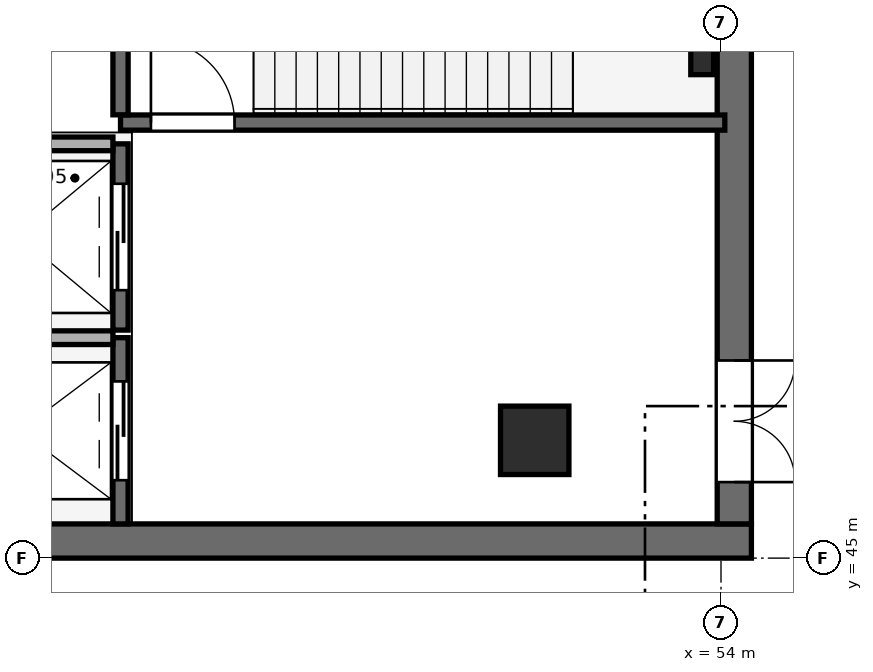
"""IFC4 building model, lengths in metres.
Left out: names, types, materials, properties, quantities, classifications, styles, units other than length and angle.
Written with IfcOpenShell. Run it as: python <this file> out.ifc"""

import sys

from ifc_helpers import new_model, si_unit, direction, frame, frame_2d, origin, origin_2d, place, context, subcontext, project, spatial, rectangle, i_section, extrude, element, fill, save


model = new_model("IFC4")
c1 = context("Model", 3, precision=1e-05, world=origin(), true_north=direction((0.0, 1.0)))
c2 = subcontext(c1, "Body", "Model", "MODEL_VIEW")
j1 = project(units=[si_unit("LENGTHUNIT", "METRE"), si_unit("PLANEANGLEUNIT", "RADIAN")], contexts=[c1])
p1 = place(None, origin())
s1 = spatial("IfcSite", under=j1, at=p1, CompositionType="ELEMENT")
p2 = place(p1, origin())
s2 = spatial("IfcBuilding", under=s1, at=p2, CompositionType="ELEMENT")
p3 = place(p2, frame((0.0, 0.0, -5.4)))
s3 = spatial("IfcBuildingStorey", under=s2, at=p3, CompositionType="ELEMENT", Elevation=-5.4)
p4 = place(p3, frame((51.549, 46.55, 0.0), z_axis=(0.0, 0.0, 1.0), x_axis=(1.0, 0.0, 0.0)))
e1 = element("IfcColumn", 1, at=p4, inside=s3, PredefinedType="COLUMN", context=c2, shape_type="SweptSolid", body=[
    extrude(rectangle(XDim=0.9, YDim=0.9, at=origin_2d()), origin(), (0.0, 0.0, 1.0), 5.4),
])
p5 = place(p3, frame((43.0, 45.225, 0.0), z_axis=(0.0, 0.0, 1.0), x_axis=(1.0, 0.0, 0.0)))
e2 = element("IfcWall", 2, at=p5, inside=s3, PredefinedType="SHEAR", context=c2, shape_type="SweptSolid", body=[
    extrude(rectangle(XDim=11.4, YDim=0.45, at=frame_2d((5.7, 0.0))), origin(), (0.0, 0.0, 1.0), 5.4),
])
p6 = place(p3, frame((54.175, 45.45, 0.0), z_axis=(0.0, 0.0, 1.0), x_axis=(0.0, 1.0, 0.0)))
e3 = element("IfcWall", 3, at=p6, inside=s3, PredefinedType="SHEAR", context=c2, shape_type="SweptSolid", body=[
    extrude(rectangle(XDim=9.1, YDim=0.45, at=frame_2d((4.55, 0.0))), origin(), (0.0, 0.0, 1.0), 5.4),
])
p7 = place(p6, frame((0.55, 0.0, 0.0)))
e4 = element("IfcOpeningElement", 4, at=p7, cuts=e3, PredefinedType="OPENING", context=c2, shape_type="SweptSolid", body=[
    extrude(rectangle(XDim=1.6, YDim=2.2, at=frame_2d((0.8, 1.1))), frame((0.0, 0.235, 0.0), z_axis=(0.0, -1.0, 0.0), x_axis=(1.0, 0.0, 0.0)), (0.0, 0.0, 1.0), 0.47),
])
p8 = place(p3, frame((53.752, 51.611, 0.0), z_axis=(0.0, 0.0, 1.0), x_axis=(1.0, 0.0, 0.0)))
e5 = element("IfcColumn", 5, at=p8, inside=s3, PredefinedType="COLUMN", context=c2, shape_type="SweptSolid", body=[
    extrude(i_section(OverallWidth=0.3, OverallDepth=0.5, WebThickness=0.014, FlangeThickness=0.028, FilletRadius=0.027, at=origin_2d()), origin(), (0.0, 0.0, 1.0), 5.4),
])
p9 = place(p3, frame((46.1, 45.45, 0.0), z_axis=(0.0, 0.0, 1.0), x_axis=(0.0, 1.0, 0.0)))
e6 = element("IfcWall", 6, at=p9, inside=s3, PredefinedType="SHEAR", context=c2, shape_type="SweptSolid", body=[
    extrude(rectangle(XDim=2.45, YDim=0.2, at=frame_2d((1.225, 0.0))), origin(), (0.0, 0.0, 1.0), 5.04),
])
p10 = place(p9, frame((0.575, 0.0, 0.0)))
e7 = element("IfcOpeningElement", 7, at=p10, cuts=e6, PredefinedType="OPENING", context=c2, shape_type="SweptSolid", body=[
    extrude(rectangle(XDim=1.3, YDim=2.2, at=frame_2d((0.65, 1.1))), frame((0.0, 0.11, 0.0), z_axis=(0.0, -1.0, 0.0), x_axis=(1.0, 0.0, 0.0)), (0.0, 0.0, 1.0), 0.22),
])
p11 = place(p3, frame((43.55, 47.9, 0.0), z_axis=(0.0, 0.0, 1.0), x_axis=(1.0, 0.0, 0.0)))
e8 = element("IfcWall", 8, at=p11, inside=s3, PredefinedType="PARTITIONING", context=c2, shape_type="SweptSolid", body=[
    extrude(rectangle(XDim=2.45, YDim=0.18, at=frame_2d((1.225, 0.0))), origin(), (0.0, 0.0, 1.0), 5.4),
])
p12 = place(p3, frame((46.1, 48.0, 0.0), z_axis=(0.0, 0.0, 1.0), x_axis=(0.0, 1.0, 0.0)))
e9 = element("IfcWall", 9, at=p12, inside=s3, PredefinedType="SHEAR", context=c2, shape_type="SweptSolid", body=[
    extrude(rectangle(XDim=2.45, YDim=0.2, at=frame_2d((1.225, 0.0))), origin(), (0.0, 0.0, 1.0), 5.04),
])
p13 = place(p12, frame((0.525, 0.0, 0.0)))
e10 = element("IfcOpeningElement", 10, at=p13, cuts=e9, PredefinedType="OPENING", context=c2, shape_type="SweptSolid", body=[
    extrude(rectangle(XDim=1.4, YDim=2.2, at=frame_2d((0.7, 1.1))), frame((0.0, 0.11, 0.0), z_axis=(0.0, -1.0, 0.0), x_axis=(1.0, 0.0, 0.0)), (0.0, 0.0, 1.0), 0.22),
])
p14 = place(p3, frame((43.55, 50.45, 0.0), z_axis=(0.0, 0.0, 1.0), x_axis=(1.0, 0.0, 0.0)))
e11 = element("IfcWall", 11, at=p14, inside=s3, PredefinedType="PARTITIONING", context=c2, shape_type="SweptSolid", body=[
    extrude(rectangle(XDim=2.45, YDim=0.18, at=frame_2d((1.225, 0.0))), origin(), (0.0, 0.0, 1.0), 5.4),
])
p15 = place(p3, frame((46.1, 50.73, 0.0), z_axis=(0.0, 0.0, 1.0), x_axis=(1.0, 0.0, 0.0)))
e12 = element("IfcWall", 12, at=p15, inside=s3, PredefinedType="SHEAR", context=c2, shape_type="SweptSolid", body=[
    extrude(rectangle(XDim=7.95, YDim=0.2, at=frame_2d((3.975, 0.0))), origin(), (0.0, 0.0, 1.0), 5.4),
])
p16 = place(p15, frame((0.4, 0.0, 0.0)))
e13 = element("IfcOpeningElement", 13, at=p16, cuts=e12, PredefinedType="OPENING", context=c2, shape_type="SweptSolid", body=[
    extrude(rectangle(XDim=1.1, YDim=2.15, at=frame_2d((0.55, 1.075))), frame((0.0, 0.11, 0.0), z_axis=(0.0, -1.0, 0.0), x_axis=(1.0, 0.0, 0.0)), (0.0, 0.0, 1.0), 0.22),
])
p17 = place(p3, frame((46.1, 50.832, 0.0), z_axis=(0.0, 0.0, 1.0), x_axis=(0.0, 1.0, 0.0)))
e14 = element("IfcWall", 14, at=p17, inside=s3, PredefinedType="SHEAR", context=c2, shape_type="SweptSolid", body=[
    extrude(rectangle(XDim=3.686, YDim=0.2, at=frame_2d((1.843, 0.0))), origin(), (0.0, 0.0, 1.0), 5.4),
])
p18 = place(p10, origin())
e15 = element("IfcDoor", 15, at=p18, inside=s3, OperationType="DOUBLE_DOOR_SLIDING", PredefinedType="DOOR", context=c2, shape_type="SweptSolid", body=[
    extrude(rectangle(XDim=1.3, YDim=2.2, at=frame_2d((0.65, 1.1))), frame((0.0, 0.025, 0.0), z_axis=(0.0, -1.0, 0.0), x_axis=(1.0, 0.0, 0.0)), (0.0, 0.0, 1.0), 0.05),
])
fill(e7, e15)
p19 = place(p13, origin())
e16 = element("IfcDoor", 16, at=p19, inside=s3, OperationType="DOUBLE_DOOR_SLIDING", PredefinedType="DOOR", context=c2, shape_type="SweptSolid", body=[
    extrude(rectangle(XDim=1.4, YDim=2.2, at=frame_2d((0.7, 1.1))), frame((0.0, 0.025, 0.0), z_axis=(0.0, -1.0, 0.0), x_axis=(1.0, 0.0, 0.0)), (0.0, 0.0, 1.0), 0.05),
])
fill(e10, e16)
p20 = place(p16, frame((1.1, 0.0, 0.0), z_axis=(0.0, 0.0, 1.0), x_axis=(-1.0, 0.0, 0.0)))
e17 = element("IfcDoor", 17, at=p20, inside=s3, OperationType="SINGLE_SWING_RIGHT", PredefinedType="DOOR", context=c2, shape_type="SweptSolid", body=[
    extrude(rectangle(XDim=1.1, YDim=2.15, at=frame_2d((0.55, 1.075))), frame((0.0, 0.025, 0.0), z_axis=(0.0, -1.0, 0.0), x_axis=(1.0, 0.0, 0.0)), (0.0, 0.0, 1.0), 0.05),
])
fill(e13, e17)
p21 = place(p7, frame((1.6, 0.0, 0.0), z_axis=(0.0, 0.0, 1.0), x_axis=(-1.0, 0.0, 0.0)))
e18 = element("IfcDoor", 18, at=p21, inside=s3, OperationType="DOUBLE_DOOR_SINGLE_SWING", PredefinedType="DOOR", context=c2, shape_type="SweptSolid", body=[
    extrude(rectangle(XDim=1.6, YDim=2.2, at=frame_2d((0.8, 1.1))), frame((0.0, 0.025, 0.0), z_axis=(0.0, -1.0, 0.0), x_axis=(1.0, 0.0, 0.0)), (0.0, 0.0, 1.0), 0.05),
])
fill(e4, e18)
save(model, sys.argv[1])
